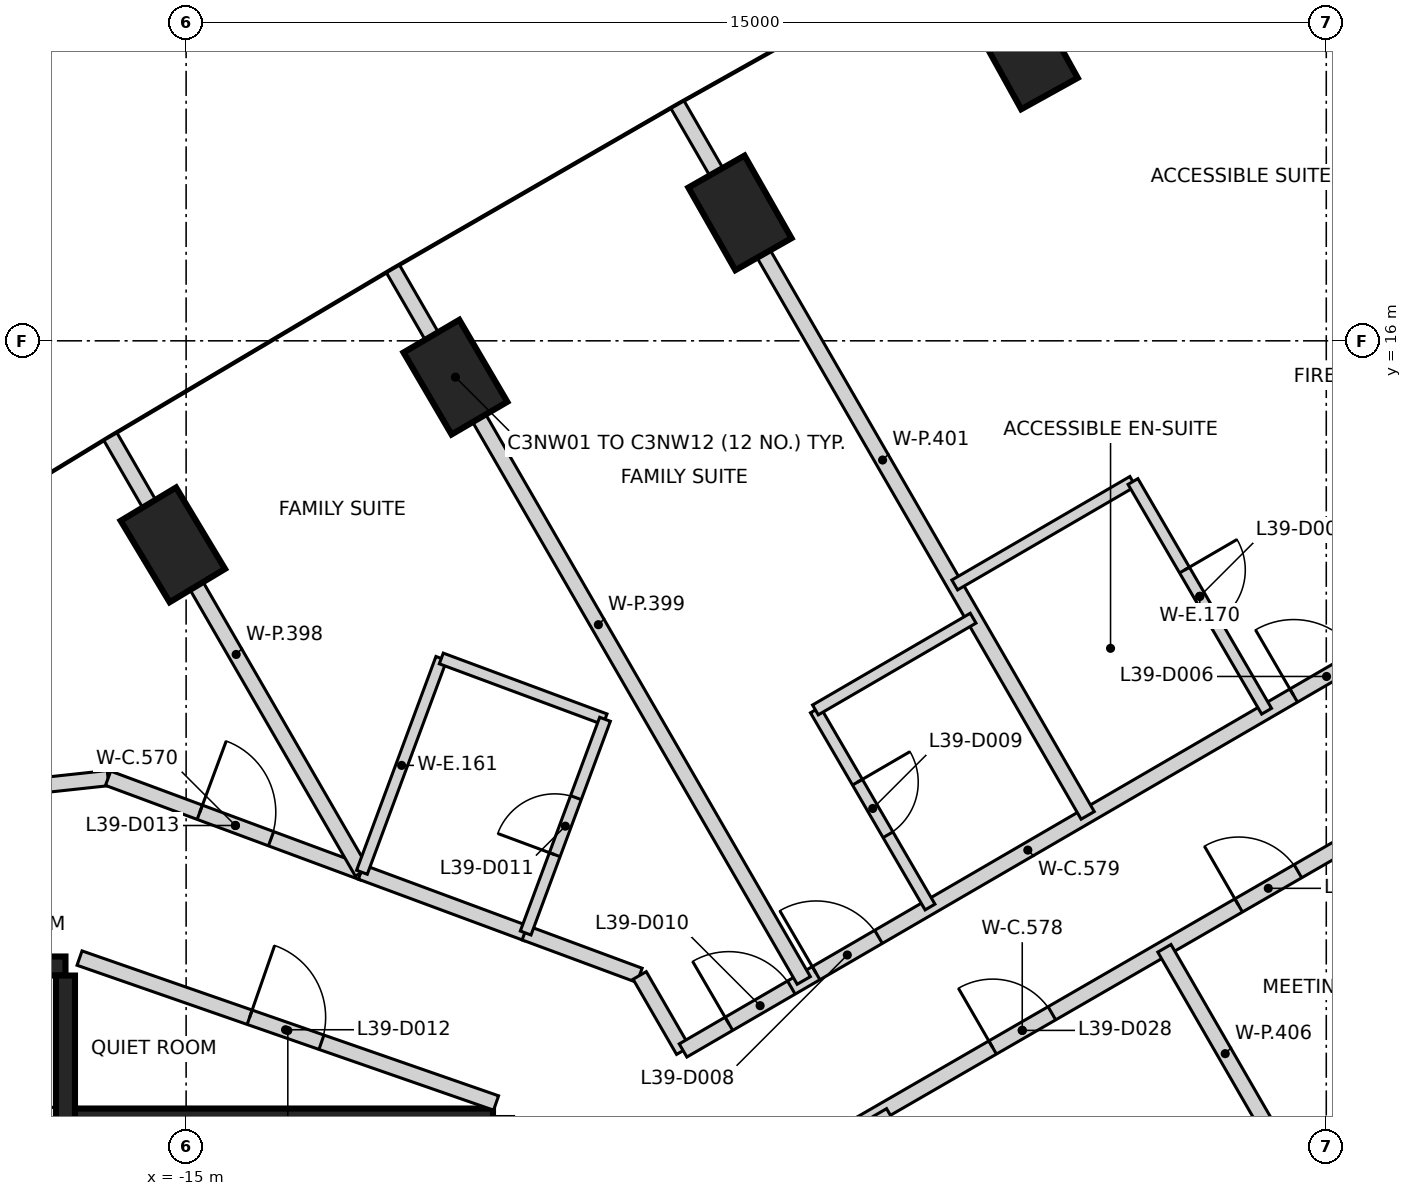
"""IFC4 building model, lengths in metres.
Left out: names, types, materials, properties, quantities, classifications, styles, units other than length and angle.
Written with IfcOpenShell. Run it as: python <this file> out.ifc"""

import sys

from ifc_helpers import new_model, si_unit, direction, frame, frame_2d, origin, origin_2d, place, context, subcontext, project, spatial, rectangle, extrude, element, fill, save


model = new_model("IFC4")
c1 = context("Model", 3, precision=1e-05, world=origin(), true_north=direction((0.0, 1.0)))
c2 = subcontext(c1, "Body", "Model", "MODEL_VIEW")
j1 = project(units=[si_unit("LENGTHUNIT", "METRE"), si_unit("PLANEANGLEUNIT", "RADIAN")], contexts=[c1])
p1 = place(None, origin())
s1 = spatial("IfcSite", under=j1, at=p1, CompositionType="ELEMENT")
p2 = place(p1, origin())
s2 = spatial("IfcBuilding", under=s1, at=p2, CompositionType="ELEMENT")
p3 = place(p2, frame((0.0, 0.0, 157.6)))
s3 = spatial("IfcBuildingStorey", under=s2, at=p3, CompositionType="ELEMENT", Elevation=157.6)
for number, where, z_axis, x_axis in (
    (1, (-3.945, 19.8, -0.4), (0.0, 0.0, 1.0), (-0.485, 0.875, 0.0)),
    (2, (-7.714, 17.683, -0.4), (0.0, 0.0, 1.0), (-0.495, 0.869, 0.0)),
    (3, (-11.457, 15.522, -0.4), (0.0, 0.0, 1.0), (-0.505, 0.863, 0.0)),
    (4, (-15.175, 13.316, -0.4), (0.0, 0.0, 1.0), (-0.515, 0.857, 0.0)),
):
    element("IfcColumn", number, at=place(p3, frame(where, z_axis=z_axis, x_axis=x_axis)), inside=s3, PredefinedType="COLUMN", context=c2, shape_type="SweptSolid", body=[
        extrude(rectangle(XDim=1.25, YDim=0.85, at=origin_2d()), origin(), (0.0, 0.0, 1.0), 3.6),
    ])
p4 = place(p3, frame((-16.472, 5.775, 0.0), z_axis=(0.0, 0.0, 1.0), x_axis=(1.0, 0.0, 0.0)))
e5 = element("IfcWall", 5, at=p4, inside=s3, PredefinedType="SHEAR", context=c2, shape_type="SweptSolid", body=[
    extrude(rectangle(XDim=5.51, YDim=0.25, at=frame_2d((2.755, 0.0))), origin(), (0.0, 0.0, 1.0), 3.2),
])
p5 = place(p3, frame((-19.637, 7.775, 0.0), z_axis=(0.0, 0.0, 1.0), x_axis=(1.0, 0.0, 0.0)))
e6 = element("IfcWall", 6, at=p5, inside=s3, PredefinedType="SHEAR", context=c2, shape_type="SweptSolid", body=[
    extrude(rectangle(XDim=3.05, YDim=0.25, at=frame_2d((1.525, 0.0))), origin(), (0.0, 0.0, 1.0), 3.2),
])
p6 = place(p3, frame((-16.587, 7.65, 0.0), z_axis=(0.0, 0.0, 1.0), x_axis=(0.0, -1.0, 0.0)))
e7 = element("IfcWall", 7, at=p6, inside=s3, PredefinedType="SHEAR", context=c2, shape_type="SweptSolid", body=[
    extrude(rectangle(XDim=2.865, YDim=0.25, at=frame_2d((1.432, 0.0))), origin(), (0.0, 0.0, 1.0), 3.2),
])
p7 = place(p3, frame((-18.865, 9.941, 0.0), z_axis=(0.0, 0.0, 1.0), x_axis=(0.99423123086, 0.107257911519, 0.0)))
e8 = element("IfcWall", 8, at=p7, inside=s3, PredefinedType="PARTITIONING", context=c2, shape_type="SweptSolid", body=[
    extrude(rectangle(XDim=2.854, YDim=0.2, at=frame_2d((1.427, 0.0))), origin(), (0.0, 0.0, 1.0), 3.2),
])
p8 = place(p3, frame((-16.402, 7.879, 0.0), z_axis=(0.0, 0.0, 1.0), x_axis=(0.944492255471, -0.328533680702, 0.0)))
e9 = element("IfcWall", 9, at=p8, inside=s3, PredefinedType="PARTITIONING", context=c2, shape_type="SweptSolid", body=[
    extrude(rectangle(XDim=5.802, YDim=0.2, at=frame_2d((2.901, 0.0))), origin(), (0.0, 0.0, 1.0), 3.2),
])
p9 = place(p8, frame((2.37, 0.0, 0.0)))
e10 = element("IfcOpeningElement", 10, at=p9, cuts=e9, PredefinedType="OPENING", context=c2, shape_type="SweptSolid", body=[
    extrude(rectangle(XDim=1.0, YDim=2.1, at=frame_2d((0.5, 1.05))), frame((0.0, 0.11, 0.0), z_axis=(0.0, -1.0, 0.0), x_axis=(1.0, 0.0, 0.0)), (0.0, 0.0, 1.0), 0.22),
])
p10 = place(p3, frame((-16.026, 10.245, 0.0), z_axis=(0.0, 0.0, 1.0), x_axis=(0.937597839511, -0.347721571584, 0.0)))
e11 = element("IfcWall", 11, at=p10, inside=s3, PredefinedType="PARTITIONING", context=c2, shape_type="SweptSolid", body=[
    extrude(rectangle(XDim=3.573, YDim=0.2, at=frame_2d((1.787, 0.0))), origin(), (0.0, 0.0, 1.0), 3.2),
])
p11 = place(p10, frame((1.287, 0.0, 0.0)))
e12 = element("IfcOpeningElement", 12, at=p11, cuts=e11, PredefinedType="OPENING", context=c2, shape_type="SweptSolid", body=[
    extrude(rectangle(XDim=1.0, YDim=2.1, at=frame_2d((0.5, 1.05))), frame((0.0, 0.11, 0.0), z_axis=(0.0, -1.0, 0.0), x_axis=(1.0, 0.0, 0.0)), (0.0, 0.0, 1.0), 0.22),
])
p12 = place(p3, frame((-12.699, 9.011, 0.0), z_axis=(0.0, 0.0, 1.0), x_axis=(0.937666284737, -0.347536959858, 0.0)))
e13 = element("IfcWall", 13, at=p12, inside=s3, PredefinedType="PARTITIONING", context=c2, shape_type="SweptSolid", body=[
    extrude(rectangle(XDim=2.322, YDim=0.2, at=frame_2d((1.161, 0.0))), origin(), (0.0, 0.0, 1.0), 3.2),
])
p13 = place(p3, frame((-10.545, 8.212, 0.0), z_axis=(0.0, 0.0, 1.0), x_axis=(0.937637162141, -0.347615523491, 0.0)))
e14 = element("IfcWall", 14, at=p13, inside=s3, PredefinedType="PARTITIONING", context=c2, shape_type="SweptSolid", body=[
    extrude(rectangle(XDim=1.61, YDim=0.2, at=frame_2d((0.805, 0.0))), origin(), (0.0, 0.0, 1.0), 3.2),
])
p14 = place(p3, frame((-9.033, 7.651, 0.0), z_axis=(0.0, 0.0, 1.0), x_axis=(0.500758224517, -0.86558719987, 0.0)))
e15 = element("IfcWall", 15, at=p14, inside=s3, PredefinedType="PARTITIONING", context=c2, shape_type="SweptSolid", body=[
    extrude(rectangle(XDim=1.142, YDim=0.2, at=frame_2d((0.571, 0.0))), origin(), (0.0, 0.0, 1.0), 3.2),
])
p15 = place(p3, frame((-8.612, 4.265, 0.0), z_axis=(0.0, 0.0, 1.0), x_axis=(0.865984415152, 0.500070987675, 0.0)))
e16 = element("IfcWall", 16, at=p15, inside=s3, PredefinedType="PARTITIONING", context=c2, shape_type="SweptSolid", body=[
    extrude(rectangle(XDim=10.651, YDim=0.2, at=frame_2d((5.326, 0.0))), origin(), (0.0, 0.0, 1.0), 3.2),
])
p16 = place(p15, frame((8.613, 0.0, 0.0)))
e17 = element("IfcOpeningElement", 17, at=p16, cuts=e16, PredefinedType="OPENING", context=c2, shape_type="SweptSolid", body=[
    extrude(rectangle(XDim=0.9, YDim=2.1, at=frame_2d((0.45, 1.05))), frame((0.0, 0.11, 0.0), z_axis=(0.0, -1.0, 0.0), x_axis=(1.0, 0.0, 0.0)), (0.0, 0.0, 1.0), 0.22),
])
p17 = place(p15, frame((4.876, 0.0, 0.0)))
e18 = element("IfcOpeningElement", 18, at=p17, cuts=e16, PredefinedType="OPENING", context=c2, shape_type="SweptSolid", body=[
    extrude(rectangle(XDim=0.9, YDim=2.1, at=frame_2d((0.45, 1.05))), frame((0.0, 0.11, 0.0), z_axis=(0.0, -1.0, 0.0), x_axis=(1.0, 0.0, 0.0)), (0.0, 0.0, 1.0), 0.22),
])
p18 = place(p15, frame((1.138, 0.0, 0.0)))
e19 = element("IfcOpeningElement", 19, at=p18, cuts=e16, PredefinedType="OPENING", context=c2, shape_type="SweptSolid", body=[
    extrude(rectangle(XDim=0.9, YDim=2.1, at=frame_2d((0.45, 1.05))), frame((0.0, 0.11, 0.0), z_axis=(0.0, -1.0, 0.0), x_axis=(1.0, 0.0, 0.0)), (0.0, 0.0, 1.0), 0.22),
])
p19 = place(p3, frame((-8.462, 6.664, 0.0), z_axis=(0.0, 0.0, 1.0), x_axis=(0.864575369233, 0.502503165081, 0.0)))
e20 = element("IfcWall", 20, at=p19, inside=s3, PredefinedType="PARTITIONING", context=c2, shape_type="SweptSolid", body=[
    extrude(rectangle(XDim=10.492, YDim=0.2, at=frame_2d((5.246, 0.0))), origin(), (0.0, 0.0, 1.0), 3.2),
])
p20 = place(p19, frame((9.292, 0.0, 0.0)))
e21 = element("IfcOpeningElement", 21, at=p20, cuts=e20, PredefinedType="OPENING", context=c2, shape_type="SweptSolid", body=[
    extrude(rectangle(XDim=1.0, YDim=2.1, at=frame_2d((0.5, 1.05))), frame((0.0, 0.11, 0.0), z_axis=(0.0, -1.0, 0.0), x_axis=(1.0, 0.0, 0.0)), (0.0, 0.0, 1.0), 0.22),
])
p21 = place(p19, frame((2.024, 0.0, 0.0)))
e22 = element("IfcOpeningElement", 22, at=p21, cuts=e20, PredefinedType="OPENING", context=c2, shape_type="SweptSolid", body=[
    extrude(rectangle(XDim=0.95, YDim=2.1, at=frame_2d((0.475, 1.05))), frame((0.0, 0.11, 0.0), z_axis=(0.0, -1.0, 0.0), x_axis=(1.0, 0.0, 0.0)), (0.0, 0.0, 1.0), 0.22),
])
p22 = place(p19, frame((0.698, 0.0, 0.0)))
e23 = element("IfcOpeningElement", 23, at=p22, cuts=e20, PredefinedType="OPENING", context=c2, shape_type="SweptSolid", body=[
    extrude(rectangle(XDim=0.95, YDim=2.1, at=frame_2d((0.475, 1.05))), frame((0.0, 0.11, 0.0), z_axis=(0.0, -1.0, 0.0), x_axis=(1.0, 0.0, 0.0)), (0.0, 0.0, 1.0), 0.22),
])
p23 = place(p3, frame((-15.996, 14.74, 0.0), z_axis=(0.0, 0.0, 1.0), x_axis=(0.500015153377, -0.866016654801, 0.0)))
e24 = element("IfcWall", 24, at=p23, inside=s3, PredefinedType="PARTITIONING", context=c2, shape_type="SweptSolid", body=[
    extrude(rectangle(XDim=6.618, YDim=0.2, at=frame_2d((3.309, 0.0))), origin(), (0.0, 0.0, 1.0), 3.2),
])
p24 = place(p3, frame((-12.279, 16.946, 0.0), z_axis=(0.0, 0.0, 1.0), x_axis=(0.500003997498, -0.866023095816, 0.0)))
e25 = element("IfcWall", 25, at=p24, inside=s3, PredefinedType="PARTITIONING", context=c2, shape_type="SweptSolid", body=[
    extrude(rectangle(XDim=10.809, YDim=0.2, at=frame_2d((5.405, 0.0))), origin(), (0.0, 0.0, 1.0), 3.2),
])
p25 = place(p3, frame((-8.535, 19.107, 0.0), z_axis=(0.0, 0.0, 1.0), x_axis=(0.499882324153, -0.866093333307, 0.0)))
e26 = element("IfcWall", 26, at=p25, inside=s3, PredefinedType="PARTITIONING", context=c2, shape_type="SweptSolid", body=[
    extrude(rectangle(XDim=10.796, YDim=0.2, at=frame_2d((5.398, 0.0))), origin(), (0.0, 0.0, 1.0), 3.2),
])
p26 = place(p3, frame((-8.0, 0.924, 0.0), z_axis=(0.0, 0.0, 1.0), x_axis=(0.86604129137, 0.499972480886, 0.0)))
e27 = element("IfcWall", 27, at=p26, inside=s3, PredefinedType="PARTITIONING", context=c2, shape_type="SweptSolid", body=[
    extrude(rectangle(XDim=12.932, YDim=0.2, at=frame_2d((6.466, 0.0))), origin(), (0.0, 0.0, 1.0), 2.3),
])
for number, where, z_axis, x_axis in (
    (28, (-5.871, 5.848, 0.0), (0.0, 0.0, 1.0), (0.5, -0.866, 0.0)),
    (29, (-2.13, 8.008, 0.0), (0.0, 0.0, 1.0), (0.5, -0.866, 0.0)),
):
    element("IfcWall", number, at=place(p3, frame(where, z_axis=z_axis, x_axis=x_axis)), inside=s3, PredefinedType="PARTITIONING", context=c2, shape_type="SweptSolid", body=[
        extrude(rectangle(XDim=3.2, YDim=0.2, at=frame_2d((1.6, 0.0))), origin(), (0.0, 0.0, 1.0), 2.3),
    ])
p27 = place(p3, frame((-12.687, 9.008, 0.0), z_axis=(0.0, 0.0, 1.0), x_axis=(0.347929104424, 0.937520846859, 0.0)))
e30 = element("IfcWall", 30, at=p27, inside=s3, PredefinedType="PARTITIONING", context=c2, shape_type="SweptSolid", body=[
    extrude(rectangle(XDim=3.0, YDim=0.15, at=frame_2d((1.5, 0.0))), origin(), (0.0, 0.0, 1.0), 3.2),
])
p28 = place(p3, frame((-11.643, 11.821, 0.0), z_axis=(0.0, 0.0, 1.0), x_axis=(0.937429235302, -0.348175859015, 0.0)))
e31 = element("IfcWall", 31, at=p28, inside=s3, PredefinedType="PARTITIONING", context=c2, shape_type="SweptSolid", body=[
    extrude(rectangle(XDim=2.298, YDim=0.15, at=frame_2d((1.149, 0.0))), origin(), (0.0, 0.0, 1.0), 3.2),
])
p29 = place(p3, frame((-10.533, 8.209, 0.0), z_axis=(0.0, 0.0, 1.0), x_axis=(0.348035300423, 0.937481428968, 0.0)))
e32 = element("IfcWall", 32, at=p29, inside=s3, PredefinedType="PARTITIONING", context=c2, shape_type="SweptSolid", body=[
    extrude(rectangle(XDim=3.0, YDim=0.15, at=frame_2d((1.5, 0.0))), origin(), (0.0, 0.0, 1.0), 3.2),
])
p30 = place(p29, frame((1.1, 0.0, 0.0)))
e33 = element("IfcOpeningElement", 33, at=p30, cuts=e32, PredefinedType="OPENING", context=c2, shape_type="SweptSolid", body=[
    extrude(rectangle(XDim=0.8, YDim=2.1, at=frame_2d((0.4, 1.05))), frame((0.0, 0.085, 0.0), z_axis=(0.0, -1.0, 0.0), x_axis=(1.0, 0.0, 0.0)), (0.0, 0.0, 1.0), 0.17),
])
p31 = place(p3, frame((-6.721, 11.144, 0.0), z_axis=(0.0, 0.0, 1.0), x_axis=(0.502742108773, -0.864436447673, 0.0)))
e34 = element("IfcWall", 34, at=p31, inside=s3, PredefinedType="PARTITIONING", context=c2, shape_type="SweptSolid", body=[
    extrude(rectangle(XDim=3.0, YDim=0.15, at=frame_2d((1.5, 0.0))), origin(), (0.0, 0.0, 1.0), 3.2),
])
p32 = place(p31, frame((1.1, 0.0, 0.0)))
e35 = element("IfcOpeningElement", 35, at=p32, cuts=e34, PredefinedType="OPENING", context=c2, shape_type="SweptSolid", body=[
    extrude(rectangle(XDim=0.8, YDim=2.1, at=frame_2d((0.4, 1.05))), frame((0.0, 0.085, 0.0), z_axis=(0.0, -1.0, 0.0), x_axis=(1.0, 0.0, 0.0)), (0.0, 0.0, 1.0), 0.17),
])
p33 = place(p3, frame((-6.721, 11.144, 0.0), z_axis=(0.0, 0.0, 1.0), x_axis=(0.864386917082, 0.502827264155, 0.0)))
e36 = element("IfcWall", 36, at=p33, inside=s3, PredefinedType="PARTITIONING", context=c2, shape_type="SweptSolid", body=[
    extrude(rectangle(XDim=2.4, YDim=0.15, at=frame_2d((1.2, 0.0))), origin(), (0.0, 0.0, 1.0), 3.2),
])
p34 = place(p3, frame((-4.888, 12.788, 0.0), z_axis=(0.0, 0.0, 1.0), x_axis=(0.864480777266, 0.502665878827, 0.0)))
e37 = element("IfcWall", 37, at=p34, inside=s3, PredefinedType="PARTITIONING", context=c2, shape_type="SweptSolid", body=[
    extrude(rectangle(XDim=2.709, YDim=0.15, at=frame_2d((1.354, 0.0))), origin(), (0.0, 0.0, 1.0), 3.2),
])
p35 = place(p3, frame((-2.543, 14.149, 0.0), z_axis=(0.0, 0.0, 1.0), x_axis=(0.502854686853, -0.864370964292, 0.0)))
e38 = element("IfcWall", 38, at=p35, inside=s3, PredefinedType="PARTITIONING", context=c2, shape_type="SweptSolid", body=[
    extrude(rectangle(XDim=3.496, YDim=0.15, at=frame_2d((1.748, 0.0))), origin(), (0.0, 0.0, 1.0), 3.2),
])
p36 = place(p35, frame((1.348, 0.0, 0.0)))
e39 = element("IfcOpeningElement", 39, at=p36, cuts=e38, PredefinedType="OPENING", context=c2, shape_type="SweptSolid", body=[
    extrude(rectangle(XDim=0.8, YDim=2.1, at=frame_2d((0.4, 1.05))), frame((0.0, 0.085, 0.0), z_axis=(0.0, -1.0, 0.0), x_axis=(1.0, 0.0, 0.0)), (0.0, 0.0, 1.0), 0.17),
])
p37 = place(p20, origin())
e40 = element("IfcDoor", 40, at=p37, inside=s3, OperationType="SINGLE_SWING_LEFT", PredefinedType="DOOR", context=c2, shape_type="SweptSolid", body=[
    extrude(rectangle(XDim=1.0, YDim=2.1, at=frame_2d((0.5, 1.05))), frame((0.0, 0.025, 0.0), z_axis=(0.0, -1.0, 0.0), x_axis=(1.0, 0.0, 0.0)), (0.0, 0.0, 1.0), 0.05),
])
fill(e21, e40)
p38 = place(p36, origin())
e41 = element("IfcDoor", 41, at=p38, inside=s3, OperationType="SINGLE_SWING_LEFT", PredefinedType="DOOR", context=c2, shape_type="SweptSolid", body=[
    extrude(rectangle(XDim=0.8, YDim=2.1, at=frame_2d((0.4, 1.05))), frame((0.0, 0.025, 0.0), z_axis=(0.0, -1.0, 0.0), x_axis=(1.0, 0.0, 0.0)), (0.0, 0.0, 1.0), 0.05),
])
fill(e39, e41)
p39 = place(p21, origin())
e42 = element("IfcDoor", 42, at=p39, inside=s3, OperationType="SINGLE_SWING_LEFT", PredefinedType="DOOR", context=c2, shape_type="SweptSolid", body=[
    extrude(rectangle(XDim=0.95, YDim=2.1, at=frame_2d((0.475, 1.05))), frame((0.0, 0.025, 0.0), z_axis=(0.0, -1.0, 0.0), x_axis=(1.0, 0.0, 0.0)), (0.0, 0.0, 1.0), 0.05),
])
fill(e22, e42)
p40 = place(p32, origin())
e43 = element("IfcDoor", 43, at=p40, inside=s3, OperationType="SINGLE_SWING_LEFT", PredefinedType="DOOR", context=c2, shape_type="SweptSolid", body=[
    extrude(rectangle(XDim=0.8, YDim=2.1, at=frame_2d((0.4, 1.05))), frame((0.0, 0.025, 0.0), z_axis=(0.0, -1.0, 0.0), x_axis=(1.0, 0.0, 0.0)), (0.0, 0.0, 1.0), 0.05),
])
fill(e35, e43)
p41 = place(p22, origin())
e44 = element("IfcDoor", 44, at=p41, inside=s3, OperationType="SINGLE_SWING_LEFT", PredefinedType="DOOR", context=c2, shape_type="SweptSolid", body=[
    extrude(rectangle(XDim=0.95, YDim=2.1, at=frame_2d((0.475, 1.05))), frame((0.0, 0.025, 0.0), z_axis=(0.0, -1.0, 0.0), x_axis=(1.0, 0.0, 0.0)), (0.0, 0.0, 1.0), 0.05),
])
fill(e23, e44)
p42 = place(p30, origin())
e45 = element("IfcDoor", 45, at=p42, inside=s3, OperationType="SINGLE_SWING_LEFT", PredefinedType="DOOR", context=c2, shape_type="SweptSolid", body=[
    extrude(rectangle(XDim=0.8, YDim=2.1, at=frame_2d((0.4, 1.05))), frame((0.0, 0.025, 0.0), z_axis=(0.0, -1.0, 0.0), x_axis=(1.0, 0.0, 0.0)), (0.0, 0.0, 1.0), 0.05),
])
fill(e33, e45)
p43 = place(p9, frame((1.0, 0.0, 0.0), z_axis=(0.0, 0.0, 1.0), x_axis=(-1.0, 0.0, 0.0)))
e46 = element("IfcDoor", 46, at=p43, inside=s3, OperationType="SINGLE_SWING_LEFT", PredefinedType="DOOR", context=c2, shape_type="SweptSolid", body=[
    extrude(rectangle(XDim=1.0, YDim=2.1, at=frame_2d((0.5, 1.05))), frame((0.0, 0.025, 0.0), z_axis=(0.0, -1.0, 0.0), x_axis=(1.0, 0.0, 0.0)), (0.0, 0.0, 1.0), 0.05),
])
fill(e10, e46)
p44 = place(p11, frame((1.0, 0.0, 0.0), z_axis=(0.0, 0.0, 1.0), x_axis=(-1.0, 0.0, 0.0)))
e47 = element("IfcDoor", 47, at=p44, inside=s3, OperationType="SINGLE_SWING_LEFT", PredefinedType="DOOR", context=c2, shape_type="SweptSolid", body=[
    extrude(rectangle(XDim=1.0, YDim=2.1, at=frame_2d((0.5, 1.05))), frame((0.0, 0.025, 0.0), z_axis=(0.0, -1.0, 0.0), x_axis=(1.0, 0.0, 0.0)), (0.0, 0.0, 1.0), 0.05),
])
fill(e12, e47)
p45 = place(p16, frame((0.9, 0.0, 0.0), z_axis=(0.0, 0.0, 1.0), x_axis=(-1.0, 0.0, 0.0)))
e48 = element("IfcDoor", 48, at=p45, inside=s3, OperationType="SINGLE_SWING_LEFT", PredefinedType="DOOR", context=c2, shape_type="SweptSolid", body=[
    extrude(rectangle(XDim=0.9, YDim=2.1, at=frame_2d((0.45, 1.05))), frame((0.0, 0.025, 0.0), z_axis=(0.0, -1.0, 0.0), x_axis=(1.0, 0.0, 0.0)), (0.0, 0.0, 1.0), 0.05),
])
fill(e17, e48)
p46 = place(p17, frame((0.9, 0.0, 0.0), z_axis=(0.0, 0.0, 1.0), x_axis=(-1.0, 0.0, 0.0)))
e49 = element("IfcDoor", 49, at=p46, inside=s3, OperationType="SINGLE_SWING_LEFT", PredefinedType="DOOR", context=c2, shape_type="SweptSolid", body=[
    extrude(rectangle(XDim=0.9, YDim=2.1, at=frame_2d((0.45, 1.05))), frame((0.0, 0.025, 0.0), z_axis=(0.0, -1.0, 0.0), x_axis=(1.0, 0.0, 0.0)), (0.0, 0.0, 1.0), 0.05),
])
fill(e18, e49)
save(model, sys.argv[1])
